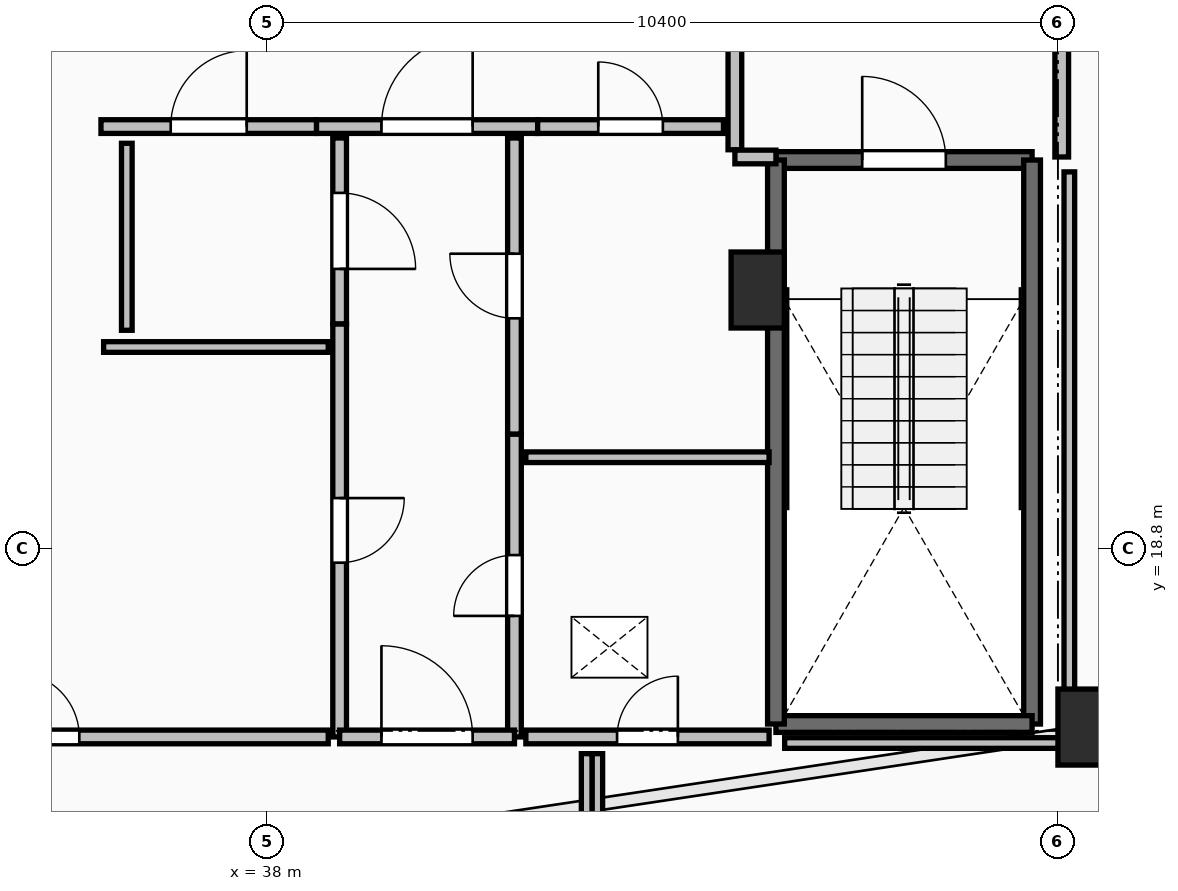
"""IFC4 building model, lengths in metres.
Left out: names, types, materials, properties, quantities, classifications, styles, units other than length and angle.
Written with IfcOpenShell. Run it as: python <this file> out.ifc"""

import sys

from ifc_helpers import new_model, si_unit, direction, frame, frame_2d, origin, origin_2d, place, context, subcontext, project, spatial, rectangle, extrude, element, fill, save


model = new_model("IFC4")
c1 = context("Model", 3, precision=1e-05, world=origin(), true_north=direction((0.0, 1.0)))
c2 = subcontext(c1, "Body", "Model", "MODEL_VIEW")
j1 = project(units=[si_unit("LENGTHUNIT", "METRE"), si_unit("PLANEANGLEUNIT", "RADIAN")], contexts=[c1])
p1 = place(None, origin())
s1 = spatial("IfcSite", under=j1, at=p1, CompositionType="ELEMENT")
p2 = place(p1, origin())
s2 = spatial("IfcBuilding", under=s1, at=p2, CompositionType="ELEMENT")
p3 = place(p2, frame((0.0, 0.0, 237.8)))
s3 = spatial("IfcBuildingStorey", under=s2, at=p3, CompositionType="ELEMENT", Elevation=237.8)
for number, where, z_axis, x_axis in (
    (1, (48.75, 16.45, 0.0), (0.0, 0.0, 1.0), (1.0, 0.0, 0.0)),
    (2, (44.45, 22.2, 0.0), (0.0, 0.0, 1.0), (1.0, 0.0, 0.0)),
):
    element("IfcColumn", number, at=place(p3, frame(where, z_axis=z_axis, x_axis=x_axis)), inside=s3, PredefinedType="PILASTER", context=c2, shape_type="SweptSolid", body=[
        extrude(rectangle(XDim=0.7, YDim=1.0, at=origin_2d()), origin(), (0.0, 0.0, 1.0), 3.55),
    ])
p4 = place(p3, frame((44.69, 23.91, 0.0), z_axis=(0.0, 0.0, 1.0), x_axis=(1.0, 0.0, 0.0)))
e3 = element("IfcWall", 3, at=p4, inside=s3, PredefinedType="SOLIDWALL", context=c2, shape_type="SweptSolid", body=[
    extrude(rectangle(XDim=3.37, YDim=0.22, at=frame_2d((1.685, 0.0))), origin(), (0.0, 0.0, 1.0), 3.29),
])
p5 = place(p4, frame((1.135, 0.0, 0.0)))
e4 = element("IfcOpeningElement", 4, at=p5, cuts=e3, PredefinedType="OPENING", context=c2, shape_type="SweptSolid", body=[
    extrude(rectangle(XDim=1.1, YDim=2.15, at=frame_2d((0.55, 1.075))), frame((0.0, 0.125, 0.0), z_axis=(0.0, -1.0, 0.0), x_axis=(1.0, 0.0, 0.0)), (0.0, 0.0, 1.0), 0.25),
])
p6 = place(p3, frame((48.06, 23.91, 0.0), z_axis=(0.0, 0.0, 1.0), x_axis=(0.0, -1.0, 0.0)))
e5 = element("IfcWall", 5, at=p6, inside=s3, PredefinedType="SOLIDWALL", context=c2, shape_type="SweptSolid", body=[
    extrude(rectangle(XDim=7.42, YDim=0.22, at=frame_2d((3.71, 0.0))), origin(), (0.0, 0.0, 1.0), 3.29),
])
p7 = place(p3, frame((48.06, 16.49, 0.0), z_axis=(0.0, 0.0, 1.0), x_axis=(-1.0, 0.0, 0.0)))
e6 = element("IfcWall", 6, at=p7, inside=s3, PredefinedType="SOLIDWALL", context=c2, shape_type="SweptSolid", body=[
    extrude(rectangle(XDim=3.37, YDim=0.22, at=frame_2d((1.685, 0.0))), origin(), (0.0, 0.0, 1.0), 3.29),
])
p8 = place(p3, frame((44.69, 16.49, 0.0), z_axis=(0.0, 0.0, 1.0), x_axis=(0.0, 1.0, 0.0)))
e7 = element("IfcWall", 7, at=p8, inside=s3, PredefinedType="SOLIDWALL", context=c2, shape_type="SweptSolid", body=[
    extrude(rectangle(XDim=7.42, YDim=0.22, at=frame_2d((3.71, 0.0))), origin(), (0.0, 0.0, 1.0), 3.29),
])
p9 = place(p3, frame((44.15, 27.955, 0.0), z_axis=(0.0, 0.0, 1.0), x_axis=(0.0, -1.0, 0.0)))
e8 = element("IfcWall", 8, at=p9, inside=s3, PredefinedType="PARTITIONING", context=c2, shape_type="SweptSolid", body=[
    extrude(rectangle(XDim=3.91, YDim=0.18, at=frame_2d((1.955, 0.0))), origin(), (0.0, 0.0, 1.0), 3.29),
])
p10 = place(p9, frame((1.355, 0.0, 0.0)))
e9 = element("IfcOpeningElement", 9, at=p10, cuts=e8, PredefinedType="OPENING", context=c2, shape_type="SweptSolid", body=[
    extrude(rectangle(XDim=1.2, YDim=2.15, at=frame_2d((0.6, 1.075))), frame((0.0, 0.105, 0.0), z_axis=(0.0, -1.0, 0.0), x_axis=(1.0, 0.0, 0.0)), (0.0, 0.0, 1.0), 0.21),
])
p11 = place(p3, frame((44.15, 23.95, 0.0), z_axis=(0.0, 0.0, 1.0), x_axis=(1.0, 0.0, 0.0)))
e10 = element("IfcWall", 10, at=p11, inside=s3, PredefinedType="PARTITIONING", context=c2, shape_type="SweptSolid", body=[
    extrude(rectangle(XDim=0.54, YDim=0.18, at=frame_2d((0.27, 0.0))), origin(), (0.0, 0.0, 1.0), 3.29),
])
p12 = place(p3, frame((48.45, 23.95, 0.0), z_axis=(0.0, 0.0, 1.0), x_axis=(0.0, 1.0, 0.0)))
e11 = element("IfcWall", 11, at=p12, inside=s3, PredefinedType="PARTITIONING", context=c2, shape_type="SweptSolid", body=[
    extrude(rectangle(XDim=4.05, YDim=0.18, at=frame_2d((2.025, 0.0))), origin(), (0.0, 0.0, 1.0), 3.29),
])
p13 = place(p12, frame((1.425, 0.0, 0.0)))
e12 = element("IfcOpeningElement", 12, at=p13, cuts=e11, PredefinedType="OPENING", context=c2, shape_type="SweptSolid", body=[
    extrude(rectangle(XDim=1.2, YDim=2.15, at=frame_2d((0.6, 1.075))), frame((0.0, 0.105, 0.0), z_axis=(0.0, -1.0, 0.0), x_axis=(1.0, 0.0, 0.0)), (0.0, 0.0, 1.0), 0.21),
])
p14 = place(p3, frame((38.645, 24.35, 0.0), z_axis=(0.0, 0.0, 1.0), x_axis=(1.0, 0.0, 0.0)))
e13 = element("IfcWall", 13, at=p14, inside=s3, PredefinedType="PARTITIONING", context=c2, shape_type="SweptSolid", body=[
    extrude(rectangle(XDim=2.91, YDim=0.18, at=frame_2d((1.455, 0.0))), origin(), (0.0, 0.0, 1.0), 3.29),
])
p15 = place(p14, frame((0.855, 0.0, 0.0)))
e14 = element("IfcOpeningElement", 14, at=p15, cuts=e13, PredefinedType="OPENING", context=c2, shape_type="SweptSolid", body=[
    extrude(rectangle(XDim=1.2, YDim=2.15, at=frame_2d((0.6, 1.075))), frame((0.0, 0.105, 0.0), z_axis=(0.0, -1.0, 0.0), x_axis=(1.0, 0.0, 0.0)), (0.0, 0.0, 1.0), 0.21),
])
p16 = place(p3, frame((41.555, 24.35, 0.0), z_axis=(0.0, 0.0, 1.0), x_axis=(1.0, 0.0, 0.0)))
e15 = element("IfcWall", 15, at=p16, inside=s3, PredefinedType="PARTITIONING", context=c2, shape_type="SweptSolid", body=[
    extrude(rectangle(XDim=2.445, YDim=0.18, at=frame_2d((1.223, 0.0))), origin(), (0.0, 0.0, 1.0), 3.29),
])
p17 = place(p16, frame((0.798, 0.0, 0.0)))
e16 = element("IfcOpeningElement", 16, at=p17, cuts=e15, PredefinedType="OPENING", context=c2, shape_type="SweptSolid", body=[
    extrude(rectangle(XDim=0.85, YDim=2.1, at=frame_2d((0.425, 1.05))), frame((0.0, 0.105, 0.0), z_axis=(0.0, -1.0, 0.0), x_axis=(1.0, 0.0, 0.0)), (0.0, 0.0, 1.0), 0.21),
])
p18 = place(p3, frame((35.81, 24.35, 0.0), z_axis=(0.0, 0.0, 1.0), x_axis=(1.0, 0.0, 0.0)))
e17 = element("IfcWall", 17, at=p18, inside=s3, PredefinedType="PARTITIONING", context=c2, shape_type="SweptSolid", body=[
    extrude(rectangle(XDim=2.835, YDim=0.18, at=frame_2d((1.417, 0.0))), origin(), (0.0, 0.0, 1.0), 3.29),
])
p19 = place(p18, frame((0.917, 0.0, 0.0)))
e18 = element("IfcOpeningElement", 18, at=p19, cuts=e17, PredefinedType="OPENING", context=c2, shape_type="SweptSolid", body=[
    extrude(rectangle(XDim=1.0, YDim=2.15, at=frame_2d((0.5, 1.075))), frame((0.0, 0.105, 0.0), z_axis=(0.0, -1.0, 0.0), x_axis=(1.0, 0.0, 0.0)), (0.0, 0.0, 1.0), 0.21),
])
p20 = place(p3, frame((41.25, 16.32, 0.0), z_axis=(0.0, 0.0, 1.0), x_axis=(0.0, 1.0, 0.0)))
e19 = element("IfcWall", 19, at=p20, inside=s3, PredefinedType="PARTITIONING", context=c2, shape_type="SweptSolid", body=[
    extrude(rectangle(XDim=3.985, YDim=0.18, at=frame_2d((1.992, 0.0))), origin(), (0.0, 0.0, 1.0), 3.29),
])
p21 = place(p20, frame((1.593, 0.0, 0.0)))
e20 = element("IfcOpeningElement", 20, at=p21, cuts=e19, PredefinedType="OPENING", context=c2, shape_type="SweptSolid", body=[
    extrude(rectangle(XDim=0.8, YDim=2.05, at=frame_2d((0.4, 1.025))), frame((0.0, 0.105, 0.0), z_axis=(0.0, -1.0, 0.0), x_axis=(1.0, 0.0, 0.0)), (0.0, 0.0, 1.0), 0.21),
])
p22 = place(p3, frame((41.25, 20.305, 0.0), z_axis=(0.0, 0.0, 1.0), x_axis=(0.0, 1.0, 0.0)))
e21 = element("IfcWall", 21, at=p22, inside=s3, PredefinedType="PARTITIONING", context=c2, shape_type="SweptSolid", body=[
    extrude(rectangle(XDim=3.895, YDim=0.18, at=frame_2d((1.948, 0.0))), origin(), (0.0, 0.0, 1.0), 2.482),
])
p23 = place(p22, frame((1.522, 0.0, 0.0)))
e22 = element("IfcOpeningElement", 22, at=p23, cuts=e21, PredefinedType="OPENING", context=c2, shape_type="SweptSolid", body=[
    extrude(rectangle(XDim=0.85, YDim=2.1, at=frame_2d((0.425, 1.05))), frame((0.0, 0.105, 0.0), z_axis=(0.0, -1.0, 0.0), x_axis=(1.0, 0.0, 0.0)), (0.0, 0.0, 1.0), 0.21),
])
p24 = place(p3, frame((38.95, 21.755, 0.0), z_axis=(0.0, 0.0, 1.0), x_axis=(0.0, -1.0, 0.0)))
e23 = element("IfcWall", 23, at=p24, inside=s3, PredefinedType="PARTITIONING", context=c2, shape_type="SweptSolid", body=[
    extrude(rectangle(XDim=5.435, YDim=0.18, at=frame_2d((2.717, 0.0))), origin(), (0.0, 0.0, 1.0), 3.29),
])
p25 = place(p24, frame((2.292, 0.0, 0.0)))
e24 = element("IfcOpeningElement", 24, at=p25, cuts=e23, PredefinedType="OPENING", context=c2, shape_type="SweptSolid", body=[
    extrude(rectangle(XDim=0.85, YDim=2.1, at=frame_2d((0.425, 1.05))), frame((0.0, 0.105, 0.0), z_axis=(0.0, -1.0, 0.0), x_axis=(1.0, 0.0, 0.0)), (0.0, 0.0, 1.0), 0.21),
])
p26 = place(p3, frame((38.95, 24.2, 0.0), z_axis=(0.0, 0.0, 1.0), x_axis=(0.0, -1.0, 0.0)))
e25 = element("IfcWall", 25, at=p26, inside=s3, PredefinedType="PARTITIONING", context=c2, shape_type="SweptSolid", body=[
    extrude(rectangle(XDim=2.445, YDim=0.18, at=frame_2d((1.223, 0.0))), origin(), (0.0, 0.0, 1.0), 2.482),
])
p27 = place(p26, frame((0.722, 0.0, 0.0)))
e26 = element("IfcOpeningElement", 26, at=p27, cuts=e25, PredefinedType="OPENING", context=c2, shape_type="SweptSolid", body=[
    extrude(rectangle(XDim=1.0, YDim=2.15, at=frame_2d((0.5, 1.075))), frame((0.0, 0.105, 0.0), z_axis=(0.0, -1.0, 0.0), x_axis=(1.0, 0.0, 0.0)), (0.0, 0.0, 1.0), 0.21),
])
p28 = place(p3, frame((38.95, 16.32, 0.0), z_axis=(0.0, 0.0, 1.0), x_axis=(1.0, 0.0, 0.0)))
e27 = element("IfcWall", 27, at=p28, inside=s3, PredefinedType="PARTITIONING", context=c2, shape_type="SweptSolid", body=[
    extrude(rectangle(XDim=2.3, YDim=0.18, at=frame_2d((1.15, 0.0))), origin(), (0.0, 0.0, 1.0), 3.29),
])
p29 = place(p28, frame((0.55, 0.0, 0.0)))
e28 = element("IfcOpeningElement", 28, at=p29, cuts=e27, PredefinedType="OPENING", context=c2, shape_type="SweptSolid", body=[
    extrude(rectangle(XDim=1.2, YDim=2.15, at=frame_2d((0.6, 1.075))), frame((0.0, 0.105, 0.0), z_axis=(0.0, -1.0, 0.0), x_axis=(1.0, 0.0, 0.0)), (0.0, 0.0, 1.0), 0.21),
])
p30 = place(p3, frame((44.6, 20.0, 0.0), z_axis=(0.0, 0.0, 1.0), x_axis=(-1.0, 0.0, 0.0)))
e29 = element("IfcWall", 29, at=p30, inside=s3, PredefinedType="PARTITIONING", context=c2, shape_type="SweptSolid", body=[
    extrude(rectangle(XDim=3.2, YDim=0.14, at=frame_2d((1.6, 0.0))), origin(), (0.0, 0.0, 1.0), 3.29),
])
p31 = place(p3, frame((41.4, 16.32, 0.0), z_axis=(0.0, 0.0, 1.0), x_axis=(1.0, 0.0, 0.0)))
e30 = element("IfcWall", 30, at=p31, inside=s3, PredefinedType="PARTITIONING", context=c2, shape_type="SweptSolid", body=[
    extrude(rectangle(XDim=3.2, YDim=0.18, at=frame_2d((1.6, 0.0))), origin(), (0.0, 0.0, 1.0), 3.29),
])
p32 = place(p31, frame((1.2, 0.0, 0.0)))
e31 = element("IfcOpeningElement", 31, at=p32, cuts=e30, PredefinedType="OPENING", context=c2, shape_type="SweptSolid", body=[
    extrude(rectangle(XDim=0.8, YDim=2.05, at=frame_2d((0.4, 1.025))), frame((0.0, 0.105, 0.0), z_axis=(0.0, -1.0, 0.0), x_axis=(1.0, 0.0, 0.0)), (0.0, 0.0, 1.0), 0.21),
])
p33 = place(p3, frame((38.8, 21.45, 0.0), z_axis=(0.0, 0.0, 1.0), x_axis=(-1.0, 0.0, 0.0)))
e32 = element("IfcWall", 32, at=p33, inside=s3, PredefinedType="PARTITIONING", context=c2, shape_type="SweptSolid", body=[
    extrude(rectangle(XDim=2.955, YDim=0.14, at=frame_2d((1.478, 0.0))), origin(), (0.0, 0.0, 1.0), 3.29),
])
p34 = place(p3, frame((31.4, 16.32, 0.0), z_axis=(0.0, 0.0, 1.0), x_axis=(1.0, 0.0, 0.0)))
e33 = element("IfcWall", 33, at=p34, inside=s3, PredefinedType="PARTITIONING", context=c2, shape_type="SweptSolid", body=[
    extrude(rectangle(XDim=7.4, YDim=0.18, at=frame_2d((3.7, 0.0))), origin(), (0.0, 0.0, 1.0), 3.29),
])
p35 = place(p34, frame((3.275, 0.0, 0.0)))
e34 = element("IfcOpeningElement", 34, at=p35, cuts=e33, PredefinedType="OPENING", context=c2, shape_type="SweptSolid", body=[
    extrude(rectangle(XDim=0.85, YDim=2.1, at=frame_2d((0.425, 1.05))), frame((0.0, 0.105, 0.0), z_axis=(0.0, -1.0, 0.0), x_axis=(1.0, 0.0, 0.0)), (0.0, 0.0, 1.0), 0.21),
])
p36 = place(p3, frame((36.15, 24.13, 0.0), z_axis=(0.0, 0.0, 1.0), x_axis=(0.0, -1.0, 0.0)))
e35 = element("IfcWall", 35, at=p36, inside=s3, PredefinedType="PARTITIONING", context=c2, shape_type="SweptSolid", body=[
    extrude(rectangle(XDim=2.46, YDim=0.14, at=frame_2d((1.23, 0.0))), origin(), (0.0, 0.0, 1.0), 2.482),
])
p37 = place(p3, frame((42.34, 14.27, 0.0), z_axis=(0.0, 0.0, 1.0), x_axis=(0.0, 1.0, 0.0)))
e36 = element("IfcWall", 36, at=p37, inside=s3, PredefinedType="PARTITIONING", context=c2, shape_type="SweptSolid", body=[
    extrude(rectangle(XDim=1.83, YDim=0.14, at=frame_2d((0.915, 0.0))), origin(), (0.0, 0.0, 1.0), 3.29),
])
p38 = place(p3, frame((44.805, 16.24, 0.0), z_axis=(0.0, 0.0, 1.0), x_axis=(1.0, 0.0, 0.0)))
e37 = element("IfcWall", 37, at=p38, inside=s3, PredefinedType="PARTITIONING", context=c2, shape_type="SweptSolid", body=[
    extrude(rectangle(XDim=3.745, YDim=0.14, at=frame_2d((1.873, 0.0))), origin(), (0.0, 0.0, 1.0), 2.482),
])
p39 = place(p3, frame((48.55, 16.24, 0.0), z_axis=(0.0, 0.0, 1.0), x_axis=(0.0, 1.0, 0.0)))
e38 = element("IfcWall", 38, at=p39, inside=s3, PredefinedType="PARTITIONING", context=c2, shape_type="SweptSolid", body=[
    extrude(rectangle(XDim=7.514, YDim=0.14, at=frame_2d((3.757, 0.0))), origin(), (0.0, 0.0, 1.0), 2.482),
])
p40 = place(p3, frame((42.2, 16.1, 0.0), z_axis=(0.0, 0.0, 1.0), x_axis=(0.0, -1.0, 0.0)))
e39 = element("IfcWall", 39, at=p40, inside=s3, PredefinedType="PARTITIONING", context=c2, shape_type="SweptSolid", body=[
    extrude(rectangle(XDim=1.83, YDim=0.14, at=frame_2d((0.915, 0.0))), origin(), (0.0, 0.0, 1.0), 3.29),
])
p41 = place(p5, origin())
e40 = element("IfcDoor", 40, at=p41, inside=s3, OperationType="SINGLE_SWING_LEFT", PredefinedType="DOOR", context=c2, shape_type="SweptSolid", body=[
    extrude(rectangle(XDim=1.1, YDim=2.15, at=frame_2d((0.55, 1.075))), frame((0.0, 0.025, 0.0), z_axis=(0.0, -1.0, 0.0), x_axis=(1.0, 0.0, 0.0)), (0.0, 0.0, 1.0), 0.05),
])
fill(e4, e40)
p42 = place(p15, origin())
e41 = element("IfcDoor", 41, at=p42, inside=s3, OperationType="SINGLE_SWING_RIGHT", PredefinedType="DOOR", context=c2, shape_type="SweptSolid", body=[
    extrude(rectangle(XDim=1.2, YDim=2.15, at=frame_2d((0.6, 1.075))), frame((0.0, 0.025, 0.0), z_axis=(0.0, -1.0, 0.0), x_axis=(1.0, 0.0, 0.0)), (0.0, 0.0, 1.0), 0.05),
])
fill(e14, e41)
p43 = place(p17, origin())
e42 = element("IfcDoor", 42, at=p43, inside=s3, OperationType="SINGLE_SWING_LEFT", PredefinedType="DOOR", context=c2, shape_type="SweptSolid", body=[
    extrude(rectangle(XDim=0.85, YDim=2.1, at=frame_2d((0.425, 1.05))), frame((0.0, 0.025, 0.0), z_axis=(0.0, -1.0, 0.0), x_axis=(1.0, 0.0, 0.0)), (0.0, 0.0, 1.0), 0.05),
])
fill(e16, e42)
p44 = place(p19, origin())
e43 = element("IfcDoor", 43, at=p44, inside=s3, OperationType="SINGLE_SWING_RIGHT", PredefinedType="DOOR", context=c2, shape_type="SweptSolid", body=[
    extrude(rectangle(XDim=1.0, YDim=2.15, at=frame_2d((0.5, 1.075))), frame((0.0, 0.025, 0.0), z_axis=(0.0, -1.0, 0.0), x_axis=(1.0, 0.0, 0.0)), (0.0, 0.0, 1.0), 0.05),
])
fill(e18, e43)
p45 = place(p21, origin())
e44 = element("IfcDoor", 44, at=p45, inside=s3, OperationType="SINGLE_SWING_LEFT", PredefinedType="DOOR", context=c2, shape_type="SweptSolid", body=[
    extrude(rectangle(XDim=0.8, YDim=2.05, at=frame_2d((0.4, 1.025))), frame((0.0, 0.025, 0.0), z_axis=(0.0, -1.0, 0.0), x_axis=(1.0, 0.0, 0.0)), (0.0, 0.0, 1.0), 0.05),
])
fill(e20, e44)
p46 = place(p23, origin())
e45 = element("IfcDoor", 45, at=p46, inside=s3, OperationType="SINGLE_SWING_RIGHT", PredefinedType="DOOR", context=c2, shape_type="SweptSolid", body=[
    extrude(rectangle(XDim=0.85, YDim=2.1, at=frame_2d((0.425, 1.05))), frame((0.0, 0.025, 0.0), z_axis=(0.0, -1.0, 0.0), x_axis=(1.0, 0.0, 0.0)), (0.0, 0.0, 1.0), 0.05),
])
fill(e22, e45)
p47 = place(p25, origin())
e46 = element("IfcDoor", 46, at=p47, inside=s3, OperationType="SINGLE_SWING_LEFT", PredefinedType="DOOR", context=c2, shape_type="SweptSolid", body=[
    extrude(rectangle(XDim=0.85, YDim=2.1, at=frame_2d((0.425, 1.05))), frame((0.0, 0.025, 0.0), z_axis=(0.0, -1.0, 0.0), x_axis=(1.0, 0.0, 0.0)), (0.0, 0.0, 1.0), 0.05),
])
fill(e24, e46)
p48 = place(p27, origin())
e47 = element("IfcDoor", 47, at=p48, inside=s3, OperationType="SINGLE_SWING_RIGHT", PredefinedType="DOOR", context=c2, shape_type="SweptSolid", body=[
    extrude(rectangle(XDim=1.0, YDim=2.15, at=frame_2d((0.5, 1.075))), frame((0.0, 0.025, 0.0), z_axis=(0.0, -1.0, 0.0), x_axis=(1.0, 0.0, 0.0)), (0.0, 0.0, 1.0), 0.05),
])
fill(e26, e47)
p49 = place(p29, origin())
e48 = element("IfcDoor", 48, at=p49, inside=s3, OperationType="SINGLE_SWING_LEFT", PredefinedType="DOOR", context=c2, shape_type="SweptSolid", body=[
    extrude(rectangle(XDim=1.2, YDim=2.15, at=frame_2d((0.6, 1.075))), frame((0.0, 0.025, 0.0), z_axis=(0.0, -1.0, 0.0), x_axis=(1.0, 0.0, 0.0)), (0.0, 0.0, 1.0), 0.05),
])
fill(e28, e48)
p50 = place(p32, origin())
e49 = element("IfcDoor", 49, at=p50, inside=s3, OperationType="SINGLE_SWING_RIGHT", PredefinedType="DOOR", context=c2, shape_type="SweptSolid", body=[
    extrude(rectangle(XDim=0.8, YDim=2.05, at=frame_2d((0.4, 1.025))), frame((0.0, 0.025, 0.0), z_axis=(0.0, -1.0, 0.0), x_axis=(1.0, 0.0, 0.0)), (0.0, 0.0, 1.0), 0.05),
])
fill(e31, e49)
p51 = place(p35, origin())
e50 = element("IfcDoor", 50, at=p51, inside=s3, OperationType="SINGLE_SWING_LEFT", PredefinedType="DOOR", context=c2, shape_type="SweptSolid", body=[
    extrude(rectangle(XDim=0.85, YDim=2.1, at=frame_2d((0.425, 1.05))), frame((0.0, 0.025, 0.0), z_axis=(0.0, -1.0, 0.0), x_axis=(1.0, 0.0, 0.0)), (0.0, 0.0, 1.0), 0.05),
])
fill(e34, e50)
save(model, sys.argv[1])
